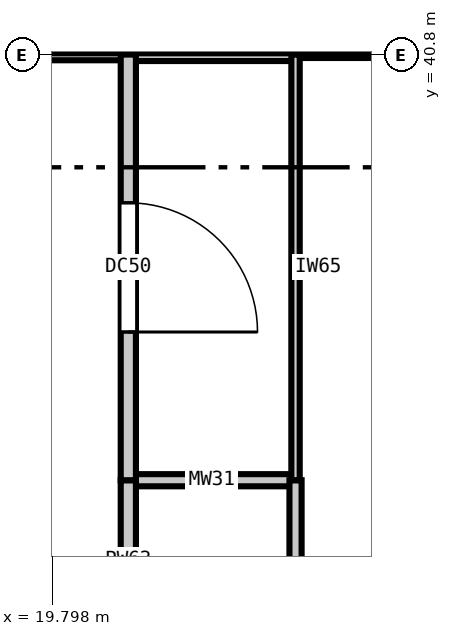
"""IFC4 building model, lengths in metres.
Left out: names, types, materials, properties, quantities, classifications, styles, units other than length and angle.
Written with IfcOpenShell. Run it as: python <this file> out.ifc"""

import sys

from ifc_helpers import new_model, si_unit, direction, frame, frame_2d, origin, place, context, subcontext, project, spatial, rectangle, extrude, element, fill, save


model = new_model("IFC4")
c1 = context("Model", 3, precision=1e-05, world=origin(), true_north=direction((0.0, 1.0)))
c2 = subcontext(c1, "Body", "Model", "MODEL_VIEW")
j1 = project(units=[si_unit("LENGTHUNIT", "METRE"), si_unit("PLANEANGLEUNIT", "RADIAN")], contexts=[c1])
p1 = place(None, origin())
s1 = spatial("IfcSite", under=j1, at=p1, CompositionType="ELEMENT")
p2 = place(p1, origin())
s2 = spatial("IfcBuilding", under=s1, at=p2, CompositionType="ELEMENT")
p3 = place(p2, frame((0.0, 0.0, 5.4)))
s3 = spatial("IfcBuildingStorey", under=s2, at=p3, CompositionType="ELEMENT", Elevation=5.4)
p4 = place(p3, frame((20.8, 35.2, 0.0), z_axis=(0.0, 0.0, 1.0), x_axis=(1.0, 0.0, 0.0)))
e1 = element("IfcWall", 1, at=p4, inside=s3, PredefinedType="PLUMBINGWALL", context=c2, shape_type="SweptSolid", body=[
    extrude(rectangle(XDim=2.2, YDim=0.16, at=frame_2d((1.1, 0.0))), origin(), (0.0, 0.0, 1.0), 5.05),
])
p5 = place(p3, frame((17.115, 40.8, 0.0), z_axis=(0.0, 0.0, 1.0), x_axis=(1.0, 0.0, 0.0)))
e2 = element("IfcWall", 2, at=p5, inside=s3, PredefinedType="PARTITIONING", context=c2, shape_type="SweptSolid", body=[
    extrude(rectangle(XDim=3.685, YDim=0.15, at=frame_2d((1.843, 0.0))), origin(), (0.0, 0.0, 1.0), 4.685),
])
p6 = place(p3, frame((20.8, 40.8, 0.0), z_axis=(0.0, 0.0, 1.0), x_axis=(1.0, 0.0, 0.0)))
e3 = element("IfcWall", 3, at=p6, inside=s3, PredefinedType="PARTITIONING", context=c2, shape_type="SweptSolid", body=[
    extrude(rectangle(XDim=2.2, YDim=0.17, at=frame_2d((1.1, 0.0))), origin(), (0.0, 0.0, 1.0), 4.685),
])
p7 = place(p3, frame((23.0, 40.8, 0.0), z_axis=(0.0, 0.0, 1.0), x_axis=(1.0, 0.0, 0.0)))
e4 = element("IfcWall", 4, at=p7, inside=s3, PredefinedType="PARTITIONING", context=c2, shape_type="SweptSolid", body=[
    extrude(rectangle(XDim=1.885, YDim=0.09, at=frame_2d((0.942, 0.0))), origin(), (0.0, 0.0, 1.0), 4.685),
])
p8 = place(p3, frame((20.8, 29.6, 0.0), z_axis=(0.0, 0.0, 1.0), x_axis=(0.0, 1.0, 0.0)))
e5 = element("IfcWall", 5, at=p8, inside=s3, PredefinedType="PARTITIONING", context=c2, shape_type="SweptSolid", body=[
    extrude(rectangle(XDim=5.6, YDim=0.2, at=frame_2d((2.8, 0.0))), origin(), (0.0, 0.0, 1.0), 5.05),
])
p9 = place(p8, frame((2.34, 0.0, 0.0)))
e6 = element("IfcOpeningElement", 6, at=p9, cuts=e5, PredefinedType="OPENING", context=c2, shape_type="SweptSolid", body=[
    extrude(rectangle(XDim=0.92, YDim=2.1, at=frame_2d((0.46, 1.05))), frame((0.0, 0.11, 0.0), z_axis=(0.0, -1.0, 0.0), x_axis=(1.0, 0.0, 0.0)), (0.0, 0.0, 1.0), 0.22),
])
p10 = place(p3, frame((20.8, 35.2, 0.0), z_axis=(0.0, 0.0, 1.0), x_axis=(0.0, 1.0, 0.0)))
e7 = element("IfcWall", 7, at=p10, inside=s3, PredefinedType="PARTITIONING", context=c2, shape_type="SweptSolid", body=[
    extrude(rectangle(XDim=5.6, YDim=0.2, at=frame_2d((2.8, 0.0))), origin(), (0.0, 0.0, 1.0), 5.05),
])
p11 = place(p10, frame((1.95, 0.0, 0.0)))
e8 = element("IfcOpeningElement", 8, at=p11, cuts=e7, PredefinedType="OPENING", context=c2, shape_type="SweptSolid", body=[
    extrude(rectangle(XDim=1.7, YDim=2.3, at=frame_2d((0.85, 1.15))), frame((0.0, 0.11, 0.0), z_axis=(0.0, -1.0, 0.0), x_axis=(1.0, 0.0, 0.0)), (0.0, 0.0, 1.0), 0.22),
])
p12 = place(p3, frame((23.0, 29.6, 0.0), z_axis=(0.0, 0.0, 1.0), x_axis=(0.0, 1.0, 0.0)))
e9 = element("IfcWall", 9, at=p12, inside=s3, PredefinedType="PLUMBINGWALL", context=c2, shape_type="SweptSolid", body=[
    extrude(rectangle(XDim=5.6, YDim=0.16, at=frame_2d((2.8, 0.0))), origin(), (0.0, 0.0, 1.0), 5.05),
])
p13 = place(p3, frame((23.0, 35.2, 0.0), z_axis=(0.0, 0.0, 1.0), x_axis=(0.0, 1.0, 0.0)))
e10 = element("IfcWall", 10, at=p13, inside=s3, PredefinedType="PARTITIONING", context=c2, shape_type="SweptSolid", body=[
    extrude(rectangle(XDim=5.6, YDim=0.11, at=frame_2d((2.8, 0.0))), origin(), (0.0, 0.0, 1.0), 5.05),
])
p14 = place(p11, frame((1.7, 0.0, 0.0), z_axis=(0.0, 0.0, 1.0), x_axis=(-1.0, 0.0, 0.0)))
e11 = element("IfcDoor", 11, at=p14, inside=s3, OperationType="SINGLE_SWING_RIGHT", PredefinedType="DOOR", context=c2, shape_type="SweptSolid", body=[
    extrude(rectangle(XDim=1.7, YDim=2.3, at=frame_2d((0.85, 1.15))), frame((0.0, 0.025, 0.0), z_axis=(0.0, -1.0, 0.0), x_axis=(1.0, 0.0, 0.0)), (0.0, 0.0, 1.0), 0.05),
])
fill(e8, e11)
save(model, sys.argv[1])
